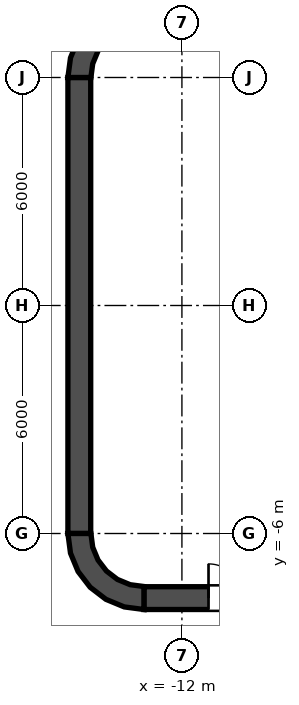
"""IFC4 building model, lengths in metres.
Left out: names, types, materials, properties, quantities, classifications, styles, units other than length and angle.
Written with IfcOpenShell. Run it as: python <this file> out.ifc"""

import sys

from ifc_helpers import new_model, si_unit, direction, frame, frame_2d, origin, place, context, subcontext, project, spatial, polyline, rectangle, outline, extrude, element, fill, save


model = new_model("IFC4")
c1 = context("Model", 3, precision=1e-05, world=origin(), true_north=direction((0.0, 1.0)))
c2 = subcontext(c1, "Body", "Model", "MODEL_VIEW")
j1 = project(units=[si_unit("LENGTHUNIT", "METRE"), si_unit("PLANEANGLEUNIT", "RADIAN")], contexts=[c1])
p1 = place(None, origin())
s1 = spatial("IfcSite", under=j1, at=p1, CompositionType="ELEMENT")
p2 = place(p1, origin())
s2 = spatial("IfcBuilding", under=s1, at=p2, CompositionType="ELEMENT")
p3 = place(p2, frame((0.0, 0.0, 131.4)))
s3 = spatial("IfcBuildingStorey", under=s2, at=p3, CompositionType="ELEMENT", Elevation=131.4)
p4 = place(p3, frame((-13.0, -7.7, 0.0), z_axis=(0.0, 0.0, 1.0), x_axis=(1.0, 0.0, 0.0)))
e1 = element("IfcWall", 1, at=p4, inside=s3, PredefinedType="SHEAR", context=c2, shape_type="SweptSolid", body=[
    extrude(rectangle(XDim=26.0, YDim=0.6, at=frame_2d((13.0, 0.0))), origin(), (0.0, 0.0, 1.0), 4.2),
])
p5 = place(p4, frame((1.7, 0.0, 0.0)))
e2 = element("IfcOpeningElement", 2, at=p5, cuts=e1, PredefinedType="OPENING", context=c2, shape_type="SweptSolid", body=[
    extrude(rectangle(XDim=1.8, YDim=2.1, at=frame_2d((0.9, 1.05))), frame((0.0, 0.3, 0.0), z_axis=(0.0, -1.0, 0.0), x_axis=(1.0, 0.0, 0.0)), (0.0, 0.0, 1.0), 0.6),
])
p6 = place(p4, frame((22.5, 0.0, 0.0)))
e3 = element("IfcOpeningElement", 3, at=p6, cuts=e1, PredefinedType="OPENING", context=c2, shape_type="SweptSolid", body=[
    extrude(rectangle(XDim=1.8, YDim=2.1, at=frame_2d((0.9, 1.05))), frame((0.0, 0.3, 0.0), z_axis=(0.0, -1.0, 0.0), x_axis=(1.0, 0.0, 0.0)), (0.0, 0.0, 1.0), 0.6),
])
p7 = place(p3, frame((-14.7, -6.0, 0.0), z_axis=(0.0, 0.0, 1.0), x_axis=(0.0, 1.0, 0.0)))
e4 = element("IfcWall", 4, at=p7, inside=s3, PredefinedType="SHEAR", context=c2, shape_type="SweptSolid", body=[
    extrude(rectangle(XDim=12.0, YDim=0.6, at=frame_2d((6.0, 0.0))), origin(), (0.0, 0.0, 1.0), 4.2),
])
p8 = place(p3, origin())
e5 = element("IfcWall", 5, at=p8, inside=s3, PredefinedType="SHEAR", context=c2, shape_type="SweptSolid", body=[
    extrude(outline(polyline([(-15.0, 6.0), (-14.395, 6.0), (-14.347, 6.361), (-14.208, 6.698), (-13.986, 6.986), (-13.698, 7.208), (-13.361, 7.347), (-13.0, 7.395), (-13.0, 8.0), (-13.518, 7.932), (-14.0, 7.732), (-14.414, 7.414), (-14.732, 7.0), (-14.932, 6.518), (-15.0, 6.0)])), origin(), (0.0, 0.0, 1.0), 4.2),
])
e6 = element("IfcWall", 6, at=p8, inside=s3, PredefinedType="SHEAR", context=c2, shape_type="SweptSolid", body=[
    extrude(outline(polyline([(-13.0, -8.0), (-13.0, -7.395), (-13.361, -7.347), (-13.698, -7.208), (-13.986, -6.986), (-14.208, -6.698), (-14.347, -6.361), (-14.395, -6.0), (-15.0, -6.0), (-14.932, -6.518), (-14.732, -7.0), (-14.414, -7.414), (-14.0, -7.732), (-13.518, -7.932), (-13.0, -8.0)])), origin(), (0.0, 0.0, 1.0), 4.2),
])
p9 = place(p3, frame((-11.8, -7.4, 0.0), z_axis=(0.0, 0.0, 1.0), x_axis=(0.0, 1.0, 0.0)))
e7 = element("IfcWall", 7, at=p9, inside=s3, PredefinedType="SOLIDWALL", context=c2, shape_type="SweptSolid", body=[
    extrude(rectangle(XDim=14.8, YDim=0.4, at=frame_2d((7.4, 0.0))), origin(), (0.0, 0.0, 1.0), 4.05),
])
p10 = place(p9, frame((11.2, 0.0, 0.0)))
e8 = element("IfcOpeningElement", 8, at=p10, cuts=e7, PredefinedType="OPENING", context=c2, shape_type="SweptSolid", body=[
    extrude(rectangle(XDim=1.1, YDim=2.1, at=frame_2d((0.55, 1.05))), frame((0.0, 0.2, 0.0), z_axis=(0.0, -1.0, 0.0), x_axis=(1.0, 0.0, 0.0)), (0.0, 0.0, 1.0), 0.4),
])
p11 = place(p9, frame((8.3, 0.0, 0.0)))
e9 = element("IfcOpeningElement", 9, at=p11, cuts=e7, PredefinedType="OPENING", context=c2, shape_type="SweptSolid", body=[
    extrude(rectangle(XDim=1.1, YDim=2.1, at=frame_2d((0.55, 1.05))), frame((0.0, 0.2, 0.0), z_axis=(0.0, -1.0, 0.0), x_axis=(1.0, 0.0, 0.0)), (0.0, 0.0, 1.0), 0.4),
])
p12 = place(p9, frame((5.4, 0.0, 0.0)))
e10 = element("IfcOpeningElement", 10, at=p12, cuts=e7, PredefinedType="OPENING", context=c2, shape_type="SweptSolid", body=[
    extrude(rectangle(XDim=1.1, YDim=2.1, at=frame_2d((0.55, 1.05))), frame((0.0, 0.2, 0.0), z_axis=(0.0, -1.0, 0.0), x_axis=(1.0, 0.0, 0.0)), (0.0, 0.0, 1.0), 0.4),
])
p13 = place(p9, frame((13.552, 0.0, 0.0)))
e11 = element("IfcOpeningElement", 11, at=p13, cuts=e7, PredefinedType="OPENING", context=c2, shape_type="SweptSolid", body=[
    extrude(rectangle(XDim=0.9, YDim=2.1, at=frame_2d((0.45, 1.05))), frame((0.0, 0.2, 0.0), z_axis=(0.0, -1.0, 0.0), x_axis=(1.0, 0.0, 0.0)), (0.0, 0.0, 1.0), 0.4),
])
p14 = place(p9, frame((0.347, 0.0, 0.0)))
e12 = element("IfcOpeningElement", 12, at=p14, cuts=e7, PredefinedType="OPENING", context=c2, shape_type="SweptSolid", body=[
    extrude(rectangle(XDim=0.9, YDim=2.1, at=frame_2d((0.45, 1.05))), frame((0.0, 0.2, 0.0), z_axis=(0.0, -1.0, 0.0), x_axis=(1.0, 0.0, 0.0)), (0.0, 0.0, 1.0), 0.4),
])
e13 = element("IfcWall", 13, at=p8, inside=s3, PredefinedType="SOLIDWALL", context=c2, shape_type="SweptSolid", body=[
    extrude(outline(polyline([(-12.0, -5.925), (-12.0, -5.675), (-14.15, -5.675), (-14.15, -3.025), (-12.0, -3.025), (-12.0, -2.775), (-14.15, -2.775), (-14.15, -0.125), (-12.0, -0.125), (-12.0, 0.125), (-14.15, 0.125), (-14.15, 2.775), (-12.0, 2.775), (-12.0, 3.025), (-14.15, 3.025), (-14.15, 5.675), (-12.0, 5.675), (-12.0, 5.925), (-14.15, 5.925), (-14.4, 5.925), (-14.4, 5.675), (-14.4, 3.025), (-14.4, 2.775), (-14.4, 0.125), (-14.4, -0.125), (-14.4, -2.775), (-14.4, -3.025), (-14.4, -5.675), (-14.4, -5.925), (-14.15, -5.925), (-12.0, -5.925)])), origin(), (0.0, 0.0, 1.0), 4.05),
])
p15 = place(p10, origin())
e14 = element("IfcDoor", 14, at=p15, inside=s3, OperationType="DOUBLE_DOOR_SLIDING", PredefinedType="DOOR", context=c2, shape_type="SweptSolid", body=[
    extrude(rectangle(XDim=1.1, YDim=2.1, at=frame_2d((0.55, 1.05))), frame((0.0, 0.025, 0.0), z_axis=(0.0, -1.0, 0.0), x_axis=(1.0, 0.0, 0.0)), (0.0, 0.0, 1.0), 0.05),
])
fill(e8, e14)
p16 = place(p11, origin())
e15 = element("IfcDoor", 15, at=p16, inside=s3, OperationType="DOUBLE_DOOR_SLIDING", PredefinedType="DOOR", context=c2, shape_type="SweptSolid", body=[
    extrude(rectangle(XDim=1.1, YDim=2.1, at=frame_2d((0.55, 1.05))), frame((0.0, 0.025, 0.0), z_axis=(0.0, -1.0, 0.0), x_axis=(1.0, 0.0, 0.0)), (0.0, 0.0, 1.0), 0.05),
])
fill(e9, e15)
p17 = place(p12, origin())
e16 = element("IfcDoor", 16, at=p17, inside=s3, OperationType="DOUBLE_DOOR_SLIDING", PredefinedType="DOOR", context=c2, shape_type="SweptSolid", body=[
    extrude(rectangle(XDim=1.1, YDim=2.1, at=frame_2d((0.55, 1.05))), frame((0.0, 0.025, 0.0), z_axis=(0.0, -1.0, 0.0), x_axis=(1.0, 0.0, 0.0)), (0.0, 0.0, 1.0), 0.05),
])
fill(e10, e16)
p18 = place(p13, origin())
e17 = element("IfcDoor", 17, at=p18, inside=s3, OperationType="SINGLE_SWING_LEFT", PredefinedType="DOOR", context=c2, shape_type="SweptSolid", body=[
    extrude(rectangle(XDim=0.9, YDim=2.1, at=frame_2d((0.45, 1.05))), frame((0.0, 0.025, 0.0), z_axis=(0.0, -1.0, 0.0), x_axis=(1.0, 0.0, 0.0)), (0.0, 0.0, 1.0), 0.05),
])
fill(e11, e17)
p19 = place(p14, origin())
e18 = element("IfcDoor", 18, at=p19, inside=s3, OperationType="SINGLE_SWING_LEFT", PredefinedType="DOOR", context=c2, shape_type="SweptSolid", body=[
    extrude(rectangle(XDim=0.9, YDim=2.1, at=frame_2d((0.45, 1.05))), frame((0.0, 0.025, 0.0), z_axis=(0.0, -1.0, 0.0), x_axis=(1.0, 0.0, 0.0)), (0.0, 0.0, 1.0), 0.05),
])
fill(e12, e18)
p20 = place(p5, origin())
e19 = element("IfcDoor", 19, at=p20, inside=s3, OperationType="DOUBLE_DOOR_SINGLE_SWING", PredefinedType="DOOR", context=c2, shape_type="SweptSolid", body=[
    extrude(rectangle(XDim=1.8, YDim=2.1, at=frame_2d((0.9, 1.05))), frame((0.0, 0.025, 0.0), z_axis=(0.0, -1.0, 0.0), x_axis=(1.0, 0.0, 0.0)), (0.0, 0.0, 1.0), 0.05),
])
fill(e2, e19)
save(model, sys.argv[1])
